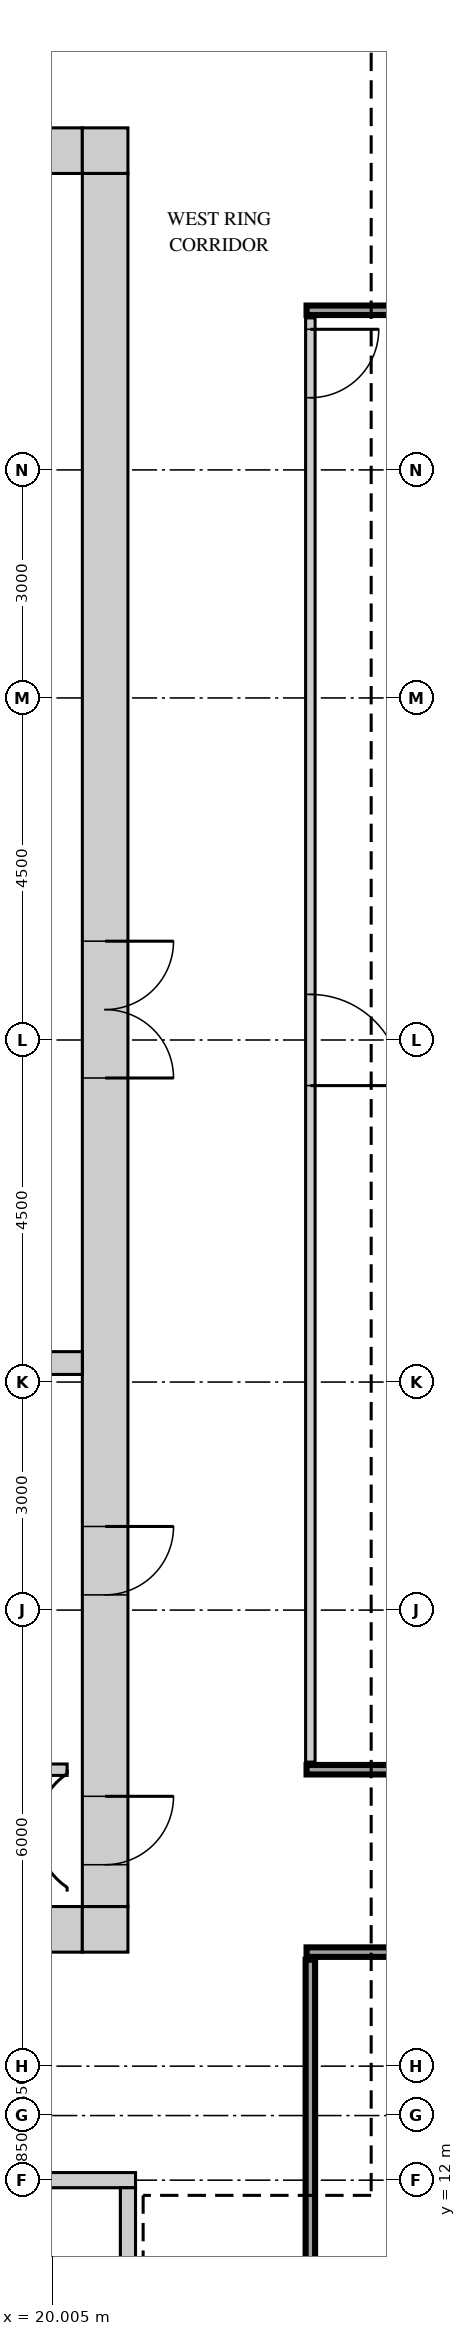
"""IFC4 building model, lengths in metres.
Left out: names, types, materials, properties, quantities, classifications, styles, units other than length and angle.
Written with IfcOpenShell. Run it as: python <this file> out.ifc"""

import sys

from ifc_helpers import new_model, si_unit, direction, frame, frame_2d, origin, place, context, subcontext, project, spatial, rectangle, extrude, source, transform, mapped, element, fill, save


model = new_model("IFC4")
c1 = context("Model", 3, precision=1e-05, world=origin(), true_north=direction((0.0, 1.0)))
c2 = subcontext(c1, "Body", "Model", "MODEL_VIEW")
j1 = project(units=[si_unit("LENGTHUNIT", "METRE"), si_unit("PLANEANGLEUNIT", "RADIAN")], contexts=[c1])
p1 = place(None, origin())
s1 = spatial("IfcSite", under=j1, at=p1, CompositionType="ELEMENT")
p2 = place(p1, origin())
s2 = spatial("IfcBuilding", under=s1, at=p2, CompositionType="ELEMENT")
p3 = place(p2, frame((0.0, 0.0, 326.2)))
s3 = spatial("IfcBuildingStorey", under=s2, at=p3, CompositionType="ELEMENT", Elevation=326.2)
m1 = source(origin(), c2, "Body", "SweptSolid", [
    extrude(rectangle(XDim=14.4, YDim=0.6, at=frame_2d((7.2, 0.0))), origin(), (0.0, 0.0, 1.0), 3.75),
])
p4 = place(p3, frame((6.0, 38.7, 0.0), z_axis=(0.0, 0.0, 1.0), x_axis=(1.0, 0.0, 0.0)))
e1 = element("IfcWall", 1, at=p4, inside=s3, PredefinedType="SHEAR", context=c2, shape_type="MappedRepresentation", body=[
    mapped(m1, transform((0.0, 0.0, 0.0))),
])
m2 = source(origin(), c2, "Body", "SweptSolid", [
    extrude(rectangle(XDim=0.9, YDim=2.1, at=frame_2d((0.45, 1.05))), frame((0.0, 0.31, 0.0), z_axis=(0.0, -1.0, 0.0), x_axis=(1.0, 0.0, 0.0)), (0.0, 0.0, 1.0), 0.62),
])
p5 = place(p4, frame((2.05, 0.0, 0.0)))
e2 = element("IfcOpeningElement", 2, at=p5, cuts=e1, PredefinedType="OPENING", context=c2, shape_type="MappedRepresentation", body=[
    mapped(m2, transform((0.0, 0.0, 0.0))),
])
p6 = place(p4, frame((5.45, 0.0, 0.0)))
e3 = element("IfcOpeningElement", 3, at=p6, cuts=e1, PredefinedType="OPENING", context=c2, shape_type="MappedRepresentation", body=[
    mapped(m2, transform((0.0, 0.0, 0.0))),
])
m3 = source(origin(), c2, "Body", "SweptSolid", [
    extrude(rectangle(XDim=1.0, YDim=2.1, at=frame_2d((0.5, 1.05))), frame((0.0, 0.31, 0.0), z_axis=(0.0, -1.0, 0.0), x_axis=(1.0, 0.0, 0.0)), (0.0, 0.0, 1.0), 0.62),
])
p7 = place(p4, frame((8.8, 0.0, 0.0)))
e4 = element("IfcOpeningElement", 4, at=p7, cuts=e1, PredefinedType="OPENING", context=c2, shape_type="MappedRepresentation", body=[
    mapped(m3, transform((0.0, 0.0, 0.0))),
])
p8 = place(p4, frame((12.15, 0.0, 0.0)))
e5 = element("IfcOpeningElement", 5, at=p8, cuts=e1, PredefinedType="OPENING", context=c2, shape_type="MappedRepresentation", body=[
    mapped(m2, transform((0.0, 0.0, 0.0))),
])
m4 = source(origin(), c2, "Body", "SweptSolid", [
    extrude(rectangle(XDim=0.6, YDim=0.6, at=frame_2d((0.3, 0.0))), origin(), (0.0, 0.0, 1.0), 3.75),
])
p9 = place(p3, frame((20.4, 38.7, 0.0), z_axis=(0.0, 0.0, 1.0), x_axis=(1.0, 0.0, 0.0)))
e6 = element("IfcWall", 6, at=p9, inside=s3, PredefinedType="SHEAR", context=c2, shape_type="MappedRepresentation", body=[
    mapped(m4, transform((0.0, 0.0, 0.0))),
])
p10 = place(p3, frame((6.0, 15.3, 0.0), z_axis=(0.0, 0.0, 1.0), x_axis=(1.0, 0.0, 0.0)))
e7 = element("IfcWall", 7, at=p10, inside=s3, PredefinedType="SHEAR", context=c2, shape_type="MappedRepresentation", body=[
    mapped(m1, transform((0.0, 0.0, 0.0))),
])
m5 = source(origin(), c2, "Body", "SweptSolid", [
    extrude(rectangle(XDim=1.2, YDim=2.1, at=frame_2d((0.6, 1.05))), frame((0.0, 0.31, 0.0), z_axis=(0.0, -1.0, 0.0), x_axis=(1.0, 0.0, 0.0)), (0.0, 0.0, 1.0), 0.62),
])
p11 = place(p10, frame((6.2, 0.0, 0.0)))
e8 = element("IfcOpeningElement", 8, at=p11, cuts=e7, PredefinedType="OPENING", context=c2, shape_type="MappedRepresentation", body=[
    mapped(m5, transform((0.0, 0.0, 0.0))),
])
p12 = place(p10, frame((2.85, 0.0, 0.0)))
e9 = element("IfcOpeningElement", 9, at=p12, cuts=e7, PredefinedType="OPENING", context=c2, shape_type="MappedRepresentation", body=[
    mapped(m5, transform((0.0, 0.0, 0.0))),
])
p13 = place(p10, frame((8.7, 0.0, 0.0)))
e10 = element("IfcOpeningElement", 10, at=p13, cuts=e7, PredefinedType="OPENING", context=c2, shape_type="MappedRepresentation", body=[
    mapped(m3, transform((0.0, 0.0, 0.0))),
])
p14 = place(p3, frame((20.4, 15.3, 0.0), z_axis=(0.0, 0.0, 1.0), x_axis=(1.0, 0.0, 0.0)))
e11 = element("IfcWall", 11, at=p14, inside=s3, PredefinedType="SHEAR", context=c2, shape_type="MappedRepresentation", body=[
    mapped(m4, transform((0.0, 0.0, 0.0))),
])
m6 = source(origin(), c2, "Body", "SweptSolid", [
    extrude(rectangle(XDim=22.8, YDim=0.6, at=frame_2d((11.4, 0.0))), origin(), (0.0, 0.0, 1.0), 3.75),
])
p15 = place(p3, frame((20.7, 15.6, 0.0), z_axis=(0.0, 0.0, 1.0), x_axis=(0.0, 1.0, 0.0)))
e12 = element("IfcWall", 12, at=p15, inside=s3, PredefinedType="SHEAR", context=c2, shape_type="MappedRepresentation", body=[
    mapped(m6, transform((0.0, 0.0, 0.0))),
])
m7 = source(origin(), c2, "Body", "SweptSolid", [
    extrude(rectangle(XDim=1.8, YDim=2.1, at=frame_2d((0.9, 1.05))), frame((0.0, 0.31, 0.0), z_axis=(0.0, -1.0, 0.0), x_axis=(1.0, 0.0, 0.0)), (0.0, 0.0, 1.0), 0.62),
])
p16 = place(p15, frame((10.9, 0.0, 0.0)))
e13 = element("IfcOpeningElement", 13, at=p16, cuts=e12, PredefinedType="OPENING", context=c2, shape_type="MappedRepresentation", body=[
    mapped(m7, transform((0.0, 0.0, 0.0))),
])
p17 = place(p15, frame((0.55, 0.0, 0.0)))
e14 = element("IfcOpeningElement", 14, at=p17, cuts=e12, PredefinedType="OPENING", context=c2, shape_type="MappedRepresentation", body=[
    mapped(m2, transform((0.0, 0.0, 0.0))),
])
p18 = place(p15, frame((4.1, 0.0, 0.0)))
e15 = element("IfcOpeningElement", 15, at=p18, cuts=e12, PredefinedType="OPENING", context=c2, shape_type="MappedRepresentation", body=[
    mapped(m2, transform((0.0, 0.0, 0.0))),
])
m8 = source(origin(), c2, "Body", "SweptSolid", [
    extrude(rectangle(XDim=7.2, YDim=0.2, at=frame_2d((3.6, 0.0))), origin(), (0.0, 0.0, 1.0), 3.75),
])
p19 = place(p3, frame((13.9, 12.0, 0.0), z_axis=(0.0, 0.0, 1.0), x_axis=(1.0, 0.0, 0.0)))
e16 = element("IfcWall", 16, at=p19, inside=s3, PredefinedType="SHEAR", context=c2, shape_type="MappedRepresentation", body=[
    mapped(m8, transform((0.0, 0.0, 0.0))),
])
m9 = source(origin(), c2, "Body", "SweptSolid", [
    extrude(rectangle(XDim=3.35, YDim=0.2, at=frame_2d((1.675, 0.0))), origin(), (0.0, 0.0, 1.0), 3.75),
])
p20 = place(p3, frame((21.0, 8.55, 0.0), z_axis=(0.0, 0.0, 1.0), x_axis=(0.0, 1.0, 0.0)))
e17 = element("IfcWall", 17, at=p20, inside=s3, PredefinedType="SHEAR", context=c2, shape_type="MappedRepresentation", body=[
    mapped(m9, transform((0.0, 0.0, 0.0))),
])
m10 = source(origin(), c2, "Body", "SweptSolid", [
    extrude(rectangle(XDim=13.2, YDim=0.3, at=frame_2d((6.6, 0.0))), origin(), (0.0, 0.0, 1.0), 3.75),
])
p21 = place(p3, frame((7.2, 22.75, 0.0), z_axis=(0.0, 0.0, 1.0), x_axis=(1.0, 0.0, 0.0)))
e18 = element("IfcWall", 18, at=p21, inside=s3, PredefinedType="STANDARD", context=c2, shape_type="MappedRepresentation", body=[
    mapped(m10, transform((0.0, 0.0, 0.0))),
])
m11 = source(origin(), c2, "Body", "SweptSolid", [
    extrude(rectangle(XDim=8.75, YDim=0.125, at=frame_2d((4.375, 0.0))), origin(), (0.0, 0.0, 1.0), 3.8),
])
p22 = place(p3, frame((23.4, 6.15, 0.0), z_axis=(0.0, 0.0, 1.0), x_axis=(0.0, 1.0, 0.0)))
e19 = element("IfcWall", 19, at=p22, inside=s3, PredefinedType="PARTITIONING", context=c2, shape_type="MappedRepresentation", body=[
    mapped(m11, transform((0.0, 0.0, 0.0))),
])
m12 = source(origin(), c2, "Body", "SweptSolid", [
    extrude(rectangle(XDim=19.1, YDim=0.125, at=frame_2d((9.55, 0.0))), origin(), (0.0, 0.0, 1.0), 3.8),
])
p23 = place(p3, frame((23.35, 15.0, 0.0), z_axis=(0.0, 0.0, 1.0), x_axis=(1.0, 0.0, 0.0)))
e20 = element("IfcWall", 20, at=p23, inside=s3, PredefinedType="PARTITIONING", context=c2, shape_type="MappedRepresentation", body=[
    mapped(m12, transform((0.0, 0.0, 0.0))),
])
m13 = source(origin(), c2, "Body", "SweptSolid", [
    extrude(rectangle(XDim=0.9, YDim=2.1, at=frame_2d((0.45, 1.05))), frame((0.0, 0.073, 0.0), z_axis=(0.0, -1.0, 0.0), x_axis=(1.0, 0.0, 0.0)), (0.0, 0.0, 1.0), 0.145),
])
p24 = place(p23, frame((5.3, 0.0, 0.0)))
e21 = element("IfcOpeningElement", 21, at=p24, cuts=e20, PredefinedType="OPENING", context=c2, shape_type="MappedRepresentation", body=[
    mapped(m13, transform((0.0, 0.0, 0.0))),
])
p25 = place(p23, frame((13.3, 0.0, 0.0)))
e22 = element("IfcOpeningElement", 22, at=p25, cuts=e20, PredefinedType="OPENING", context=c2, shape_type="MappedRepresentation", body=[
    mapped(m13, transform((0.0, 0.0, 0.0))),
])
m14 = source(origin(), c2, "Body", "SweptSolid", [
    extrude(rectangle(XDim=4.0, YDim=0.15, at=frame_2d((2.0, 0.0))), origin(), (0.0, 0.0, 1.0), 3.8),
])
p26 = place(p3, frame((16.2, 17.4, 0.0), z_axis=(0.0, 0.0, 1.0), x_axis=(1.0, 0.0, 0.0)))
e23 = element("IfcWall", 23, at=p26, inside=s3, PredefinedType="PARTITIONING", context=c2, shape_type="MappedRepresentation", body=[
    mapped(m14, transform((0.0, 0.0, 0.0))),
])
m15 = source(origin(), c2, "Body", "SweptSolid", [
    extrude(rectangle(XDim=16.7, YDim=0.125, at=frame_2d((8.35, 0.0))), origin(), (0.0, 0.0, 1.0), 3.8),
])
p27 = place(p3, frame((23.35, 17.4, 0.0), z_axis=(0.0, 0.0, 1.0), x_axis=(1.0, 0.0, 0.0)))
e24 = element("IfcWall", 24, at=p27, inside=s3, PredefinedType="PARTITIONING", context=c2, shape_type="MappedRepresentation", body=[
    mapped(m15, transform((0.0, 0.0, 0.0))),
])
m16 = source(origin(), c2, "Body", "SweptSolid", [
    extrude(rectangle(XDim=19.0, YDim=0.125, at=frame_2d((9.5, 0.0))), origin(), (0.0, 0.0, 1.0), 3.8),
])
p28 = place(p3, frame((23.4, 17.5, 0.0), z_axis=(0.0, 0.0, 1.0), x_axis=(0.0, 1.0, 0.0)))
e25 = element("IfcWall", 25, at=p28, inside=s3, PredefinedType="PARTITIONING", context=c2, shape_type="MappedRepresentation", body=[
    mapped(m16, transform((0.0, 0.0, 0.0))),
])
m17 = source(origin(), c2, "Body", "SweptSolid", [
    extrude(rectangle(XDim=1.2, YDim=2.1, at=frame_2d((0.6, 1.05))), frame((0.0, 0.073, 0.0), z_axis=(0.0, -1.0, 0.0), x_axis=(1.0, 0.0, 0.0)), (0.0, 0.0, 1.0), 0.145),
])
p29 = place(p28, frame((8.9, 0.0, 0.0)))
e26 = element("IfcOpeningElement", 26, at=p29, cuts=e25, PredefinedType="OPENING", context=c2, shape_type="MappedRepresentation", body=[
    mapped(m17, transform((0.0, 0.0, 0.0))),
])
p30 = place(p28, frame((17.95, 0.0, 0.0)))
e27 = element("IfcOpeningElement", 27, at=p30, cuts=e25, PredefinedType="OPENING", context=c2, shape_type="MappedRepresentation", body=[
    mapped(m13, transform((0.0, 0.0, 0.0))),
])
p31 = place(p3, frame((23.35, 36.6, 0.0), z_axis=(0.0, 0.0, 1.0), x_axis=(1.0, 0.0, 0.0)))
e28 = element("IfcWall", 28, at=p31, inside=s3, PredefinedType="PARTITIONING", context=c2, shape_type="MappedRepresentation", body=[
    mapped(m15, transform((0.0, 0.0, 0.0))),
])
m18 = source(origin(), c2, "Body", "SweptSolid", [
    extrude(rectangle(XDim=1.8, YDim=2.1, at=frame_2d((0.9, 1.05))), frame((0.0, 0.25, 0.0), z_axis=(0.0, -1.0, 0.0), x_axis=(1.0, 0.0, 0.0)), (0.0, 0.0, 1.0), 0.5),
])
p32 = place(p16, origin())
e29 = element("IfcDoor", 29, at=p32, inside=s3, OperationType="DOUBLE_DOOR_SINGLE_SWING", PredefinedType="DOOR", context=c2, shape_type="MappedRepresentation", body=[
    mapped(m18, transform((0.0, 0.0, 0.0))),
])
fill(e13, e29)
m19 = source(origin(), c2, "Body", "SweptSolid", [
    extrude(rectangle(XDim=0.9, YDim=2.1, at=frame_2d((0.45, 1.05))), frame((0.0, 0.25, 0.0), z_axis=(0.0, -1.0, 0.0), x_axis=(1.0, 0.0, 0.0)), (0.0, 0.0, 1.0), 0.5),
])
p33 = place(p17, origin())
e30 = element("IfcDoor", 30, at=p33, inside=s3, OperationType="SINGLE_SWING_RIGHT", PredefinedType="DOOR", context=c2, shape_type="MappedRepresentation", body=[
    mapped(m19, transform((0.0, 0.0, 0.0))),
])
fill(e14, e30)
p34 = place(p18, origin())
e31 = element("IfcDoor", 31, at=p34, inside=s3, OperationType="SINGLE_SWING_RIGHT", PredefinedType="DOOR", context=c2, shape_type="MappedRepresentation", body=[
    mapped(m19, transform((0.0, 0.0, 0.0))),
])
fill(e15, e31)
m20 = source(origin(), c2, "Body", "SweptSolid", [
    extrude(rectangle(XDim=1.2, YDim=2.1, at=frame_2d((0.6, 1.05))), frame((0.0, 0.025, 0.0), z_axis=(0.0, -1.0, 0.0), x_axis=(1.0, 0.0, 0.0)), (0.0, 0.0, 1.0), 0.05),
])
p35 = place(p29, origin())
e32 = element("IfcDoor", 32, at=p35, inside=s3, OperationType="SINGLE_SWING_LEFT", PredefinedType="DOOR", context=c2, shape_type="MappedRepresentation", body=[
    mapped(m20, transform((0.0, 0.0, 0.0))),
])
fill(e26, e32)
m21 = source(origin(), c2, "Body", "SweptSolid", [
    extrude(rectangle(XDim=0.9, YDim=2.1, at=frame_2d((0.45, 1.05))), frame((0.0, 0.025, 0.0), z_axis=(0.0, -1.0, 0.0), x_axis=(1.0, 0.0, 0.0)), (0.0, 0.0, 1.0), 0.05),
])
p36 = place(p30, origin())
e33 = element("IfcDoor", 33, at=p36, inside=s3, OperationType="SINGLE_SWING_RIGHT", PredefinedType="DOOR", context=c2, shape_type="MappedRepresentation", body=[
    mapped(m21, transform((0.0, 0.0, 0.0))),
])
fill(e27, e33)
save(model, sys.argv[1])
